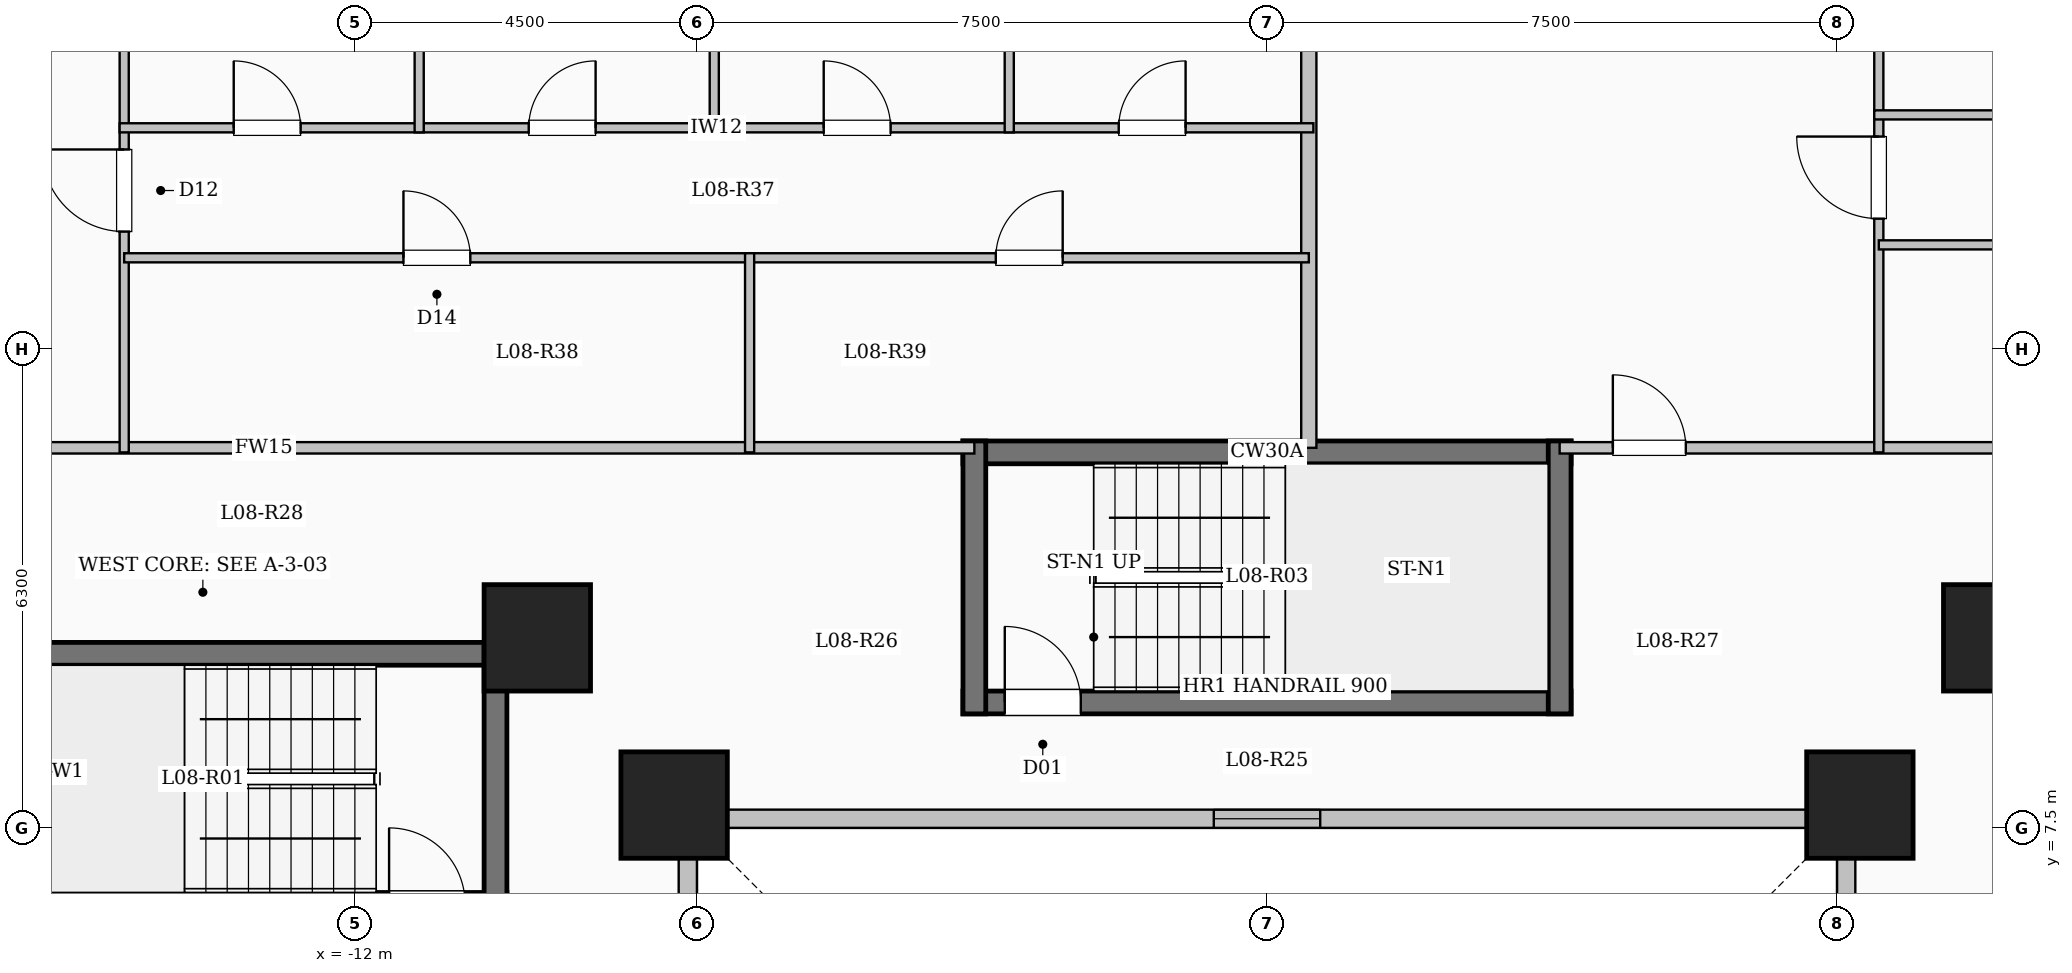
"""IFC4 building model, lengths in metres.
Left out: names, types, materials, properties, quantities, classifications, styles, units other than length and angle.
Written with IfcOpenShell. Run it as: python <this file> out.ifc"""

import sys

from ifc_helpers import new_model, si_unit, direction, frame, frame_2d, origin, origin_2d, place, context, subcontext, project, spatial, rectangle, extrude, element, fill, save


model = new_model("IFC4")
c1 = context("Model", 3, precision=1e-05, world=origin(), true_north=direction((0.0, 1.0)))
c2 = subcontext(c1, "Body", "Model", "MODEL_VIEW")
j1 = project(units=[si_unit("LENGTHUNIT", "METRE"), si_unit("PLANEANGLEUNIT", "RADIAN")], contexts=[c1])
p1 = place(None, origin())
s1 = spatial("IfcSite", under=j1, at=p1, CompositionType="ELEMENT")
p2 = place(p1, origin())
s2 = spatial("IfcBuilding", under=s1, at=p2, CompositionType="ELEMENT")
p3 = place(p2, frame((0.0, 0.0, 34.05)))
s3 = spatial("IfcBuildingStorey", under=s2, at=p3, CompositionType="ELEMENT", Elevation=34.05)
for number, where, z_axis, x_axis in (
    (1, (-7.8, 7.8, 0.0), (0.0, 0.0, 1.0), (1.0, 0.0, 0.0)),
    (2, (7.8, 7.8, 0.0), (0.0, 0.0, 1.0), (1.0, 0.0, 0.0)),
    (3, (-9.6, 10.0, 0.0), (0.0, 0.0, 1.0), (1.0, 0.0, 0.0)),
    (4, (9.6, 10.0, 0.0), (0.0, 0.0, 1.0), (1.0, 0.0, 0.0)),
):
    element("IfcColumn", number, at=place(p3, frame(where, z_axis=z_axis, x_axis=x_axis)), inside=s3, PredefinedType="COLUMN", context=c2, shape_type="SweptSolid", body=[
        extrude(rectangle(XDim=1.4, YDim=1.4, at=origin_2d()), origin(), (0.0, 0.0, 1.0), 3.35),
    ])
p4 = place(p3, frame((7.62, -7.62, 0.0), z_axis=(0.0, 0.0, 1.0), x_axis=(0.0, 1.0, 0.0)))
e5 = element("IfcWall", 5, at=p4, inside=s3, PredefinedType="SOLIDWALL", context=c2, shape_type="SweptSolid", body=[
    extrude(rectangle(XDim=15.24, YDim=0.24, at=frame_2d((7.62, 0.0))), origin(), (0.0, 0.0, 1.0), 3.1),
])
p5 = place(p4, frame((6.92, 0.0, 0.95)))
e6 = element("IfcOpeningElement", 6, at=p5, cuts=e5, PredefinedType="OPENING", context=c2, shape_type="SweptSolid", body=[
    extrude(rectangle(XDim=1.4, YDim=1.5, at=frame_2d((0.7, 0.75))), frame((0.0, 0.13, 0.0), z_axis=(0.0, -1.0, 0.0), x_axis=(1.0, 0.0, 0.0)), (0.0, 0.0, 1.0), 0.26),
])
p6 = place(p3, frame((7.62, 7.62, 0.0), z_axis=(0.0, 0.0, 1.0), x_axis=(-1.0, 0.0, 0.0)))
e7 = element("IfcWall", 7, at=p6, inside=s3, PredefinedType="SOLIDWALL", context=c2, shape_type="SweptSolid", body=[
    extrude(rectangle(XDim=15.24, YDim=0.24, at=frame_2d((7.62, 0.0))), origin(), (0.0, 0.0, 1.0), 3.1),
])
p7 = place(p6, frame((6.92, 0.0, 0.95)))
e8 = element("IfcOpeningElement", 8, at=p7, cuts=e7, PredefinedType="OPENING", context=c2, shape_type="SweptSolid", body=[
    extrude(rectangle(XDim=1.4, YDim=1.5, at=frame_2d((0.7, 0.75))), frame((0.0, 0.13, 0.0), z_axis=(0.0, -1.0, 0.0), x_axis=(1.0, 0.0, 0.0)), (0.0, 0.0, 1.0), 0.26),
])
p8 = place(p3, frame((-7.62, 7.62, 0.0), z_axis=(0.0, 0.0, 1.0), x_axis=(0.0, -1.0, 0.0)))
e9 = element("IfcWall", 9, at=p8, inside=s3, PredefinedType="SOLIDWALL", context=c2, shape_type="SweptSolid", body=[
    extrude(rectangle(XDim=15.24, YDim=0.24, at=frame_2d((7.62, 0.0))), origin(), (0.0, 0.0, 1.0), 3.1),
])
p9 = place(p8, frame((6.92, 0.0, 0.95)))
e10 = element("IfcOpeningElement", 10, at=p9, cuts=e9, PredefinedType="OPENING", context=c2, shape_type="SweptSolid", body=[
    extrude(rectangle(XDim=1.4, YDim=1.5, at=frame_2d((0.7, 0.75))), frame((0.0, 0.13, 0.0), z_axis=(0.0, -1.0, 0.0), x_axis=(1.0, 0.0, 0.0)), (0.0, 0.0, 1.0), 0.26),
])
p10 = place(p3, frame((-18.0, 9.79, 0.0), z_axis=(0.0, 0.0, 1.0), x_axis=(1.0, 0.0, 0.0)))
e11 = element("IfcWall", 11, at=p10, inside=s3, PredefinedType="SHEAR", context=c2, shape_type="SweptSolid", body=[
    extrude(rectangle(XDim=8.0, YDim=0.3, at=frame_2d((4.0, 0.0))), origin(), (0.0, 0.0, 1.0), 3.35),
])
p11 = place(p3, frame((-18.0, 6.5, 0.0), z_axis=(0.0, 0.0, 1.0), x_axis=(1.0, 0.0, 0.0)))
e12 = element("IfcWall", 12, at=p11, inside=s3, PredefinedType="SHEAR", context=c2, shape_type="SweptSolid", body=[
    extrude(rectangle(XDim=8.0, YDim=0.3, at=frame_2d((4.0, 0.0))), origin(), (0.0, 0.0, 1.0), 3.35),
])
p12 = place(p11, frame((6.45, 0.0, 0.0)))
e13 = element("IfcOpeningElement", 13, at=p12, cuts=e12, PredefinedType="OPENING", context=c2, shape_type="SweptSolid", body=[
    extrude(rectangle(XDim=1.0, YDim=2.15, at=frame_2d((0.5, 1.075))), frame((0.0, 0.16, 0.0), z_axis=(0.0, -1.0, 0.0), x_axis=(1.0, 0.0, 0.0)), (0.0, 0.0, 1.0), 0.32),
])
p13 = place(p3, frame((-10.15, 6.35, 0.0), z_axis=(0.0, 0.0, 1.0), x_axis=(0.0, 1.0, 0.0)))
e14 = element("IfcWall", 14, at=p13, inside=s3, PredefinedType="SHEAR", context=c2, shape_type="SweptSolid", body=[
    extrude(rectangle(XDim=3.59, YDim=0.3, at=frame_2d((1.795, 0.0))), origin(), (0.0, 0.0, 1.0), 3.35),
])
p14 = place(p3, frame((-4.0, 12.44, 0.0), z_axis=(0.0, 0.0, 1.0), x_axis=(1.0, 0.0, 0.0)))
e15 = element("IfcWall", 15, at=p14, inside=s3, PredefinedType="SHEAR", context=c2, shape_type="SweptSolid", body=[
    extrude(rectangle(XDim=8.0, YDim=0.3, at=frame_2d((4.0, 0.0))), origin(), (0.0, 0.0, 1.0), 3.35),
])
p15 = place(p3, frame((-4.0, 9.15, 0.0), z_axis=(0.0, 0.0, 1.0), x_axis=(1.0, 0.0, 0.0)))
e16 = element("IfcWall", 16, at=p15, inside=s3, PredefinedType="SHEAR", context=c2, shape_type="SweptSolid", body=[
    extrude(rectangle(XDim=8.0, YDim=0.3, at=frame_2d((4.0, 0.0))), origin(), (0.0, 0.0, 1.0), 3.35),
])
p16 = place(p15, frame((0.55, 0.0, 0.0)))
e17 = element("IfcOpeningElement", 17, at=p16, cuts=e16, PredefinedType="OPENING", context=c2, shape_type="SweptSolid", body=[
    extrude(rectangle(XDim=1.0, YDim=2.15, at=frame_2d((0.5, 1.075))), frame((0.0, 0.16, 0.0), z_axis=(0.0, -1.0, 0.0), x_axis=(1.0, 0.0, 0.0)), (0.0, 0.0, 1.0), 0.32),
])
for number, where, z_axis, x_axis in (
    (18, (-3.85, 9.0, 0.0), (0.0, 0.0, 1.0), (0.0, 1.0, 0.0)),
    (19, (3.85, 9.0, 0.0), (0.0, 0.0, 1.0), (0.0, 1.0, 0.0)),
):
    element("IfcWall", number, at=place(p3, frame(where, z_axis=z_axis, x_axis=x_axis)), inside=s3, PredefinedType="SHEAR", context=c2, shape_type="SweptSolid", body=[
        extrude(rectangle(XDim=3.59, YDim=0.3, at=frame_2d((1.795, 0.0))), origin(), (0.0, 0.0, 1.0), 3.35),
    ])
p17 = place(p3, frame((-22.55, 12.5, 0.0), z_axis=(0.0, 0.0, 1.0), x_axis=(1.0, 0.0, 0.0)))
e20 = element("IfcWall", 20, at=p17, inside=s3, PredefinedType="PARTITIONING", context=c2, shape_type="SweptSolid", body=[
    extrude(rectangle(XDim=18.7, YDim=0.15, at=frame_2d((9.35, 0.0))), origin(), (0.0, 0.0, 1.0), 3.1),
])
p18 = place(p17, frame((0.7, 0.0, 0.0)))
e21 = element("IfcOpeningElement", 21, at=p18, cuts=e20, PredefinedType="OPENING", context=c2, shape_type="SweptSolid", body=[
    extrude(rectangle(XDim=0.96, YDim=2.15, at=frame_2d((0.48, 1.075))), frame((0.0, 0.085, 0.0), z_axis=(0.0, -1.0, 0.0), x_axis=(1.0, 0.0, 0.0)), (0.0, 0.0, 1.0), 0.17),
])
p19 = place(p3, frame((3.85, 12.5, 0.0), z_axis=(0.0, 0.0, 1.0), x_axis=(1.0, 0.0, 0.0)))
e22 = element("IfcWall", 22, at=p19, inside=s3, PredefinedType="PARTITIONING", context=c2, shape_type="SweptSolid", body=[
    extrude(rectangle(XDim=18.7, YDim=0.15, at=frame_2d((9.35, 0.0))), origin(), (0.0, 0.0, 1.0), 3.1),
])
p20 = place(p19, frame((0.7, 0.0, 0.0)))
e23 = element("IfcOpeningElement", 23, at=p20, cuts=e22, PredefinedType="OPENING", context=c2, shape_type="SweptSolid", body=[
    extrude(rectangle(XDim=0.96, YDim=2.15, at=frame_2d((0.48, 1.075))), frame((0.0, 0.085, 0.0), z_axis=(0.0, -1.0, 0.0), x_axis=(1.0, 0.0, 0.0)), (0.0, 0.0, 1.0), 0.17),
])
p21 = place(p3, frame((0.55, 12.5, 0.0), z_axis=(0.0, 0.0, 1.0), x_axis=(0.0, 1.0, 0.0)))
e24 = element("IfcWall", 24, at=p21, inside=s3, PredefinedType="SOLIDWALL", context=c2, shape_type="SweptSolid", body=[
    extrude(rectangle(XDim=12.58, YDim=0.2, at=frame_2d((6.29, 0.0))), origin(), (0.0, 0.0, 1.0), 3.1),
])
p22 = place(p3, frame((-15.035, 12.44, 0.0), z_axis=(0.0, 0.0, 1.0), x_axis=(0.0, 1.0, 0.0)))
e25 = element("IfcWall", 25, at=p22, inside=s3, PredefinedType="PARTITIONING", context=c2, shape_type="SweptSolid", body=[
    extrude(rectangle(XDim=11.16, YDim=0.12, at=frame_2d((5.58, 0.0))), origin(), (0.0, 0.0, 1.0), 2.435),
])
p23 = place(p22, frame((2.905, 0.0, 0.0)))
e26 = element("IfcOpeningElement", 26, at=p23, cuts=e25, PredefinedType="OPENING", context=c2, shape_type="SweptSolid", body=[
    extrude(rectangle(XDim=1.08, YDim=2.15, at=frame_2d((0.54, 1.075))), frame((0.0, 0.07, 0.0), z_axis=(0.0, -1.0, 0.0), x_axis=(1.0, 0.0, 0.0)), (0.0, 0.0, 1.0), 0.14),
])
p24 = place(p3, frame((-15.035, 15.0, 0.0), z_axis=(0.0, 0.0, 1.0), x_axis=(1.0, 0.0, 0.0)))
e27 = element("IfcWall", 27, at=p24, inside=s3, PredefinedType="PARTITIONING", context=c2, shape_type="SweptSolid", body=[
    extrude(rectangle(XDim=8.228, YDim=0.12, at=frame_2d((4.114, 0.0))), origin(), (0.0, 0.0, 1.0), 2.585),
])
p25 = place(p24, frame((3.674, 0.0, 0.0)))
e28 = element("IfcOpeningElement", 28, at=p25, cuts=e27, PredefinedType="OPENING", context=c2, shape_type="SweptSolid", body=[
    extrude(rectangle(XDim=0.88, YDim=2.1, at=frame_2d((0.44, 1.05))), frame((0.0, 0.07, 0.0), z_axis=(0.0, -1.0, 0.0), x_axis=(1.0, 0.0, 0.0)), (0.0, 0.0, 1.0), 0.14),
])
p26 = place(p3, frame((-6.807, 15.0, 0.0), z_axis=(0.0, 0.0, 1.0), x_axis=(1.0, 0.0, 0.0)))
e29 = element("IfcWall", 29, at=p26, inside=s3, PredefinedType="PARTITIONING", context=c2, shape_type="SweptSolid", body=[
    extrude(rectangle(XDim=7.357, YDim=0.12, at=frame_2d((3.678, 0.0))), origin(), (0.0, 0.0, 1.0), 2.585),
])
p27 = place(p26, frame((3.239, 0.0, 0.0)))
e30 = element("IfcOpeningElement", 30, at=p27, cuts=e29, PredefinedType="OPENING", context=c2, shape_type="SweptSolid", body=[
    extrude(rectangle(XDim=0.88, YDim=2.1, at=frame_2d((0.44, 1.05))), frame((0.0, 0.07, 0.0), z_axis=(0.0, -1.0, 0.0), x_axis=(1.0, 0.0, 0.0)), (0.0, 0.0, 1.0), 0.14),
])
p28 = place(p3, frame((-15.095, 16.71, 0.0), z_axis=(0.0, 0.0, 1.0), x_axis=(1.0, 0.0, 0.0)))
e31 = element("IfcWall", 31, at=p28, inside=s3, PredefinedType="PARTITIONING", context=c2, shape_type="SweptSolid", body=[
    extrude(rectangle(XDim=15.705, YDim=0.12, at=frame_2d((7.853, 0.0))), origin(), (0.0, 0.0, 1.0), 2.585),
])
p29 = place(p28, frame((1.501, 0.0, 0.0)))
e32 = element("IfcOpeningElement", 32, at=p29, cuts=e31, PredefinedType="OPENING", context=c2, shape_type="SweptSolid", body=[
    extrude(rectangle(XDim=0.88, YDim=2.1, at=frame_2d((0.44, 1.05))), frame((0.0, 0.07, 0.0), z_axis=(0.0, -1.0, 0.0), x_axis=(1.0, 0.0, 0.0)), (0.0, 0.0, 1.0), 0.14),
])
p30 = place(p28, frame((5.382, 0.0, 0.0)))
e33 = element("IfcOpeningElement", 33, at=p30, cuts=e31, PredefinedType="OPENING", context=c2, shape_type="SweptSolid", body=[
    extrude(rectangle(XDim=0.88, YDim=2.1, at=frame_2d((0.44, 1.05))), frame((0.0, 0.07, 0.0), z_axis=(0.0, -1.0, 0.0), x_axis=(1.0, 0.0, 0.0)), (0.0, 0.0, 1.0), 0.14),
])
p31 = place(p28, frame((9.263, 0.0, 0.0)))
e34 = element("IfcOpeningElement", 34, at=p31, cuts=e31, PredefinedType="OPENING", context=c2, shape_type="SweptSolid", body=[
    extrude(rectangle(XDim=0.88, YDim=2.1, at=frame_2d((0.44, 1.05))), frame((0.0, 0.07, 0.0), z_axis=(0.0, -1.0, 0.0), x_axis=(1.0, 0.0, 0.0)), (0.0, 0.0, 1.0), 0.14),
])
p32 = place(p28, frame((13.144, 0.0, 0.0)))
e35 = element("IfcOpeningElement", 35, at=p32, cuts=e31, PredefinedType="OPENING", context=c2, shape_type="SweptSolid", body=[
    extrude(rectangle(XDim=0.88, YDim=2.1, at=frame_2d((0.44, 1.05))), frame((0.0, 0.07, 0.0), z_axis=(0.0, -1.0, 0.0), x_axis=(1.0, 0.0, 0.0)), (0.0, 0.0, 1.0), 0.14),
])
p33 = place(p3, frame((-6.807, 12.44, 0.0), z_axis=(0.0, 0.0, 1.0), x_axis=(0.0, 1.0, 0.0)))
e36 = element("IfcWall", 36, at=p33, inside=s3, PredefinedType="PARTITIONING", context=c2, shape_type="SweptSolid", body=[
    extrude(rectangle(XDim=2.62, YDim=0.12, at=frame_2d((1.31, 0.0))), origin(), (0.0, 0.0, 1.0), 3.1),
])
p34 = place(p3, frame((-11.154, 16.65, 0.0), z_axis=(0.0, 0.0, 1.0), x_axis=(0.0, 1.0, 0.0)))
e37 = element("IfcWall", 37, at=p34, inside=s3, PredefinedType="PARTITIONING", context=c2, shape_type="SweptSolid", body=[
    extrude(rectangle(XDim=6.95, YDim=0.12, at=frame_2d((3.475, 0.0))), origin(), (0.0, 0.0, 1.0), 3.1),
])
p35 = place(p3, frame((-7.272, 16.65, 0.0), z_axis=(0.0, 0.0, 1.0), x_axis=(0.0, 1.0, 0.0)))
e38 = element("IfcWall", 38, at=p35, inside=s3, PredefinedType="PARTITIONING", context=c2, shape_type="SweptSolid", body=[
    extrude(rectangle(XDim=7.87, YDim=0.12, at=frame_2d((3.935, 0.0))), origin(), (0.0, 0.0, 1.0), 2.435),
])
p36 = place(p3, frame((-3.391, 16.65, 0.0), z_axis=(0.0, 0.0, 1.0), x_axis=(0.0, 1.0, 0.0)))
e39 = element("IfcWall", 39, at=p36, inside=s3, PredefinedType="PARTITIONING", context=c2, shape_type="SweptSolid", body=[
    extrude(rectangle(XDim=8.43, YDim=0.12, at=frame_2d((4.215, 0.0))), origin(), (0.0, 0.0, 1.0), 3.1),
])
p37 = place(p3, frame((8.049, 12.44, 0.0), z_axis=(0.0, 0.0, 1.0), x_axis=(0.0, 1.0, 0.0)))
e40 = element("IfcWall", 40, at=p37, inside=s3, PredefinedType="PARTITIONING", context=c2, shape_type="SweptSolid", body=[
    extrude(rectangle(XDim=11.888, YDim=0.12, at=frame_2d((5.944, 0.0))), origin(), (0.0, 0.0, 1.0), 2.435),
])
p38 = place(p37, frame((3.075, 0.0, 0.0)))
e41 = element("IfcOpeningElement", 41, at=p38, cuts=e40, PredefinedType="OPENING", context=c2, shape_type="SweptSolid", body=[
    extrude(rectangle(XDim=1.08, YDim=2.15, at=frame_2d((0.54, 1.075))), frame((0.0, 0.07, 0.0), z_axis=(0.0, -1.0, 0.0), x_axis=(1.0, 0.0, 0.0)), (0.0, 0.0, 1.0), 0.14),
])
p39 = place(p3, frame((8.049, 15.17, 0.0), z_axis=(0.0, 0.0, 1.0), x_axis=(1.0, 0.0, 0.0)))
e42 = element("IfcWall", 42, at=p39, inside=s3, PredefinedType="PARTITIONING", context=c2, shape_type="SweptSolid", body=[
    extrude(rectangle(XDim=8.231, YDim=0.12, at=frame_2d((4.115, 0.0))), origin(), (0.0, 0.0, 1.0), 3.1),
])
p40 = place(p39, frame((3.676, 0.0, 0.0)))
e43 = element("IfcOpeningElement", 43, at=p40, cuts=e42, PredefinedType="OPENING", context=c2, shape_type="SweptSolid", body=[
    extrude(rectangle(XDim=0.88, YDim=2.1, at=frame_2d((0.44, 1.05))), frame((0.0, 0.07, 0.0), z_axis=(0.0, -1.0, 0.0), x_axis=(1.0, 0.0, 0.0)), (0.0, 0.0, 1.0), 0.14),
])
p41 = place(p3, frame((7.989, 16.88, 0.0), z_axis=(0.0, 0.0, 1.0), x_axis=(1.0, 0.0, 0.0)))
e44 = element("IfcWall", 44, at=p41, inside=s3, PredefinedType="PARTITIONING", context=c2, shape_type="SweptSolid", body=[
    extrude(rectangle(XDim=14.621, YDim=0.12, at=frame_2d((7.311, 0.0))), origin(), (0.0, 0.0, 1.0), 3.1),
])
p42 = place(p41, frame((1.967, 0.0, 0.0)))
e45 = element("IfcOpeningElement", 45, at=p42, cuts=e44, PredefinedType="OPENING", context=c2, shape_type="SweptSolid", body=[
    extrude(rectangle(XDim=0.88, YDim=2.1, at=frame_2d((0.44, 1.05))), frame((0.0, 0.07, 0.0), z_axis=(0.0, -1.0, 0.0), x_axis=(1.0, 0.0, 0.0)), (0.0, 0.0, 1.0), 0.14),
])
p43 = place(p41, frame((6.781, 0.0, 0.0)))
e46 = element("IfcOpeningElement", 46, at=p43, cuts=e44, PredefinedType="OPENING", context=c2, shape_type="SweptSolid", body=[
    extrude(rectangle(XDim=0.88, YDim=2.1, at=frame_2d((0.44, 1.05))), frame((0.0, 0.07, 0.0), z_axis=(0.0, -1.0, 0.0), x_axis=(1.0, 0.0, 0.0)), (0.0, 0.0, 1.0), 0.14),
])
p44 = place(p41, frame((11.594, 0.0, 0.0)))
e47 = element("IfcOpeningElement", 47, at=p44, cuts=e44, PredefinedType="OPENING", context=c2, shape_type="SweptSolid", body=[
    extrude(rectangle(XDim=0.88, YDim=2.1, at=frame_2d((0.44, 1.05))), frame((0.0, 0.07, 0.0), z_axis=(0.0, -1.0, 0.0), x_axis=(1.0, 0.0, 0.0)), (0.0, 0.0, 1.0), 0.14),
])
p45 = place(p7, origin())
e48 = element("IfcWindow", 48, at=p45, inside=s3, PartitioningType="SINGLE_PANEL", PredefinedType="WINDOW", context=c2, shape_type="SweptSolid", body=[
    extrude(rectangle(XDim=1.4, YDim=1.5, at=frame_2d((0.7, 0.75))), frame((0.0, 0.03, 0.0), z_axis=(0.0, -1.0, 0.0), x_axis=(1.0, 0.0, 0.0)), (0.0, 0.0, 1.0), 0.06),
])
fill(e8, e48)
p46 = place(p16, origin())
e49 = element("IfcDoor", 49, at=p46, inside=s3, OperationType="SINGLE_SWING_LEFT", PredefinedType="DOOR", context=c2, shape_type="SweptSolid", body=[
    extrude(rectangle(XDim=1.0, YDim=2.15, at=frame_2d((0.5, 1.075))), frame((0.0, 0.025, 0.0), z_axis=(0.0, -1.0, 0.0), x_axis=(1.0, 0.0, 0.0)), (0.0, 0.0, 1.0), 0.05),
])
fill(e17, e49)
p47 = place(p23, origin())
e50 = element("IfcDoor", 50, at=p47, inside=s3, OperationType="SINGLE_SWING_RIGHT", PredefinedType="DOOR", context=c2, shape_type="SweptSolid", body=[
    extrude(rectangle(XDim=1.08, YDim=2.15, at=frame_2d((0.54, 1.075))), frame((0.0, 0.025, 0.0), z_axis=(0.0, -1.0, 0.0), x_axis=(1.0, 0.0, 0.0)), (0.0, 0.0, 1.0), 0.05),
])
fill(e26, e50)
p48 = place(p25, origin())
e51 = element("IfcDoor", 51, at=p48, inside=s3, OperationType="SINGLE_SWING_LEFT", PredefinedType="DOOR", context=c2, shape_type="SweptSolid", body=[
    extrude(rectangle(XDim=0.88, YDim=2.1, at=frame_2d((0.44, 1.05))), frame((0.0, 0.025, 0.0), z_axis=(0.0, -1.0, 0.0), x_axis=(1.0, 0.0, 0.0)), (0.0, 0.0, 1.0), 0.05),
])
fill(e28, e51)
p49 = place(p27, origin())
e52 = element("IfcDoor", 52, at=p49, inside=s3, OperationType="SINGLE_SWING_RIGHT", PredefinedType="DOOR", context=c2, shape_type="SweptSolid", body=[
    extrude(rectangle(XDim=0.88, YDim=2.1, at=frame_2d((0.44, 1.05))), frame((0.0, 0.025, 0.0), z_axis=(0.0, -1.0, 0.0), x_axis=(1.0, 0.0, 0.0)), (0.0, 0.0, 1.0), 0.05),
])
fill(e30, e52)
p50 = place(p29, origin())
e53 = element("IfcDoor", 53, at=p50, inside=s3, OperationType="SINGLE_SWING_LEFT", PredefinedType="DOOR", context=c2, shape_type="SweptSolid", body=[
    extrude(rectangle(XDim=0.88, YDim=2.1, at=frame_2d((0.44, 1.05))), frame((0.0, 0.025, 0.0), z_axis=(0.0, -1.0, 0.0), x_axis=(1.0, 0.0, 0.0)), (0.0, 0.0, 1.0), 0.05),
])
fill(e32, e53)
p51 = place(p30, origin())
e54 = element("IfcDoor", 54, at=p51, inside=s3, OperationType="SINGLE_SWING_RIGHT", PredefinedType="DOOR", context=c2, shape_type="SweptSolid", body=[
    extrude(rectangle(XDim=0.88, YDim=2.1, at=frame_2d((0.44, 1.05))), frame((0.0, 0.025, 0.0), z_axis=(0.0, -1.0, 0.0), x_axis=(1.0, 0.0, 0.0)), (0.0, 0.0, 1.0), 0.05),
])
fill(e33, e54)
p52 = place(p31, origin())
e55 = element("IfcDoor", 55, at=p52, inside=s3, OperationType="SINGLE_SWING_LEFT", PredefinedType="DOOR", context=c2, shape_type="SweptSolid", body=[
    extrude(rectangle(XDim=0.88, YDim=2.1, at=frame_2d((0.44, 1.05))), frame((0.0, 0.025, 0.0), z_axis=(0.0, -1.0, 0.0), x_axis=(1.0, 0.0, 0.0)), (0.0, 0.0, 1.0), 0.05),
])
fill(e34, e55)
p53 = place(p32, origin())
e56 = element("IfcDoor", 56, at=p53, inside=s3, OperationType="SINGLE_SWING_RIGHT", PredefinedType="DOOR", context=c2, shape_type="SweptSolid", body=[
    extrude(rectangle(XDim=0.88, YDim=2.1, at=frame_2d((0.44, 1.05))), frame((0.0, 0.025, 0.0), z_axis=(0.0, -1.0, 0.0), x_axis=(1.0, 0.0, 0.0)), (0.0, 0.0, 1.0), 0.05),
])
fill(e35, e56)
p54 = place(p20, origin())
e57 = element("IfcDoor", 57, at=p54, inside=s3, OperationType="SINGLE_SWING_LEFT", PredefinedType="DOOR", context=c2, shape_type="SweptSolid", body=[
    extrude(rectangle(XDim=0.96, YDim=2.15, at=frame_2d((0.48, 1.075))), frame((0.0, 0.025, 0.0), z_axis=(0.0, -1.0, 0.0), x_axis=(1.0, 0.0, 0.0)), (0.0, 0.0, 1.0), 0.05),
])
fill(e23, e57)
p55 = place(p38, origin())
e58 = element("IfcDoor", 58, at=p55, inside=s3, OperationType="SINGLE_SWING_RIGHT", PredefinedType="DOOR", context=c2, shape_type="SweptSolid", body=[
    extrude(rectangle(XDim=1.08, YDim=2.15, at=frame_2d((0.54, 1.075))), frame((0.0, 0.025, 0.0), z_axis=(0.0, -1.0, 0.0), x_axis=(1.0, 0.0, 0.0)), (0.0, 0.0, 1.0), 0.05),
])
fill(e41, e58)
save(model, sys.argv[1])
